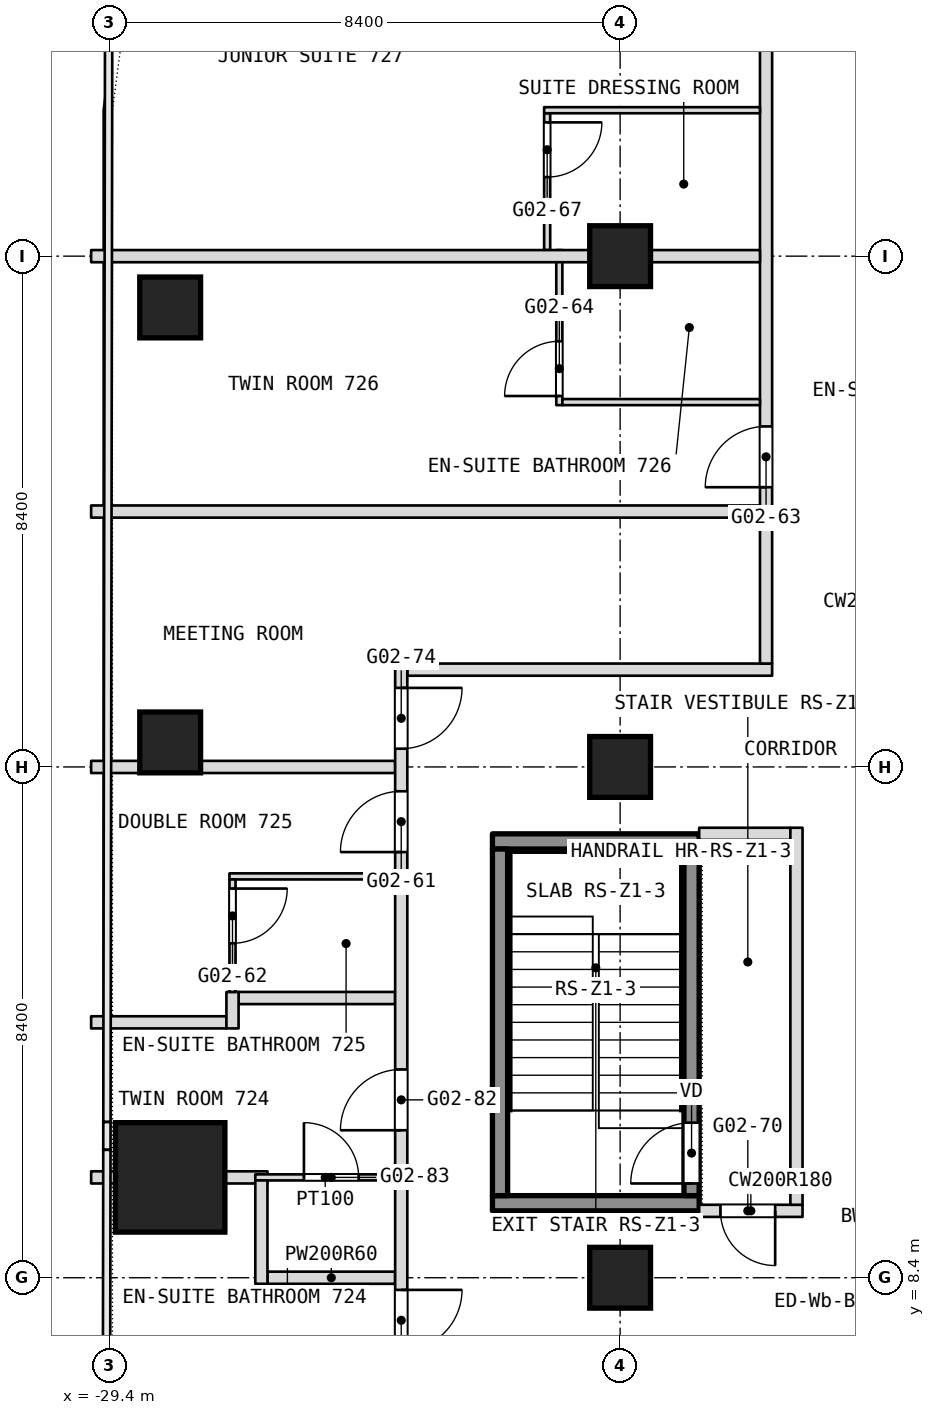
"""IFC4 building model, lengths in metres.
Left out: names, types, materials, properties, quantities, classifications, styles, units other than length and angle.
Written with IfcOpenShell. Run it as: python <this file> out.ifc"""

import sys

from ifc_helpers import new_model, si_unit, direction, frame, frame_2d, origin, origin_2d, place, context, subcontext, project, spatial, rectangle, extrude, element, fill, save


model = new_model("IFC4")
c1 = context("Model", 3, precision=1e-05, world=origin(), true_north=direction((0.0, 1.0)))
c2 = subcontext(c1, "Body", "Model", "MODEL_VIEW")
j1 = project(units=[si_unit("LENGTHUNIT", "METRE"), si_unit("PLANEANGLEUNIT", "RADIAN")], contexts=[c1])
p1 = place(None, origin())
s1 = spatial("IfcSite", under=j1, at=p1, CompositionType="ELEMENT")
p2 = place(p1, origin())
s2 = spatial("IfcBuilding", under=s1, at=p2, CompositionType="ELEMENT")
p3 = place(p2, frame((0.0, 0.0, 40.1)))
s3 = spatial("IfcBuildingStorey", under=s2, at=p3, CompositionType="ELEMENT", Elevation=40.1)
p4 = place(p3, frame((-28.4, 10.05, 0.0), z_axis=(0.0, 0.0, 1.0), x_axis=(1.0, 0.0, 0.0)))
e1 = element("IfcColumn", 1, at=p4, inside=s3, PredefinedType="COLUMN", context=c2, shape_type="SweptSolid", body=[
    extrude(rectangle(XDim=1.8, YDim=1.8, at=origin_2d()), origin(), (0.0, 0.0, 1.0), 3.6),
])
for number, where, z_axis, x_axis in (
    (2, (-21.0, 8.4, 0.0), (0.0, 0.0, 1.0), (1.0, 0.0, 0.0)),
    (3, (-21.0, 16.8, 0.0), (0.0, 0.0, 1.0), (1.0, 0.0, 0.0)),
    (4, (-21.0, 25.2, 0.0), (0.0, 0.0, 1.0), (1.0, 0.0, 0.0)),
    (5, (-28.4, 17.203, 0.0), (0.0, 0.0, 1.0), (1.0, 0.0, 0.0)),
    (6, (-28.4, 24.356, 0.0), (0.0, 0.0, 1.0), (1.0, 0.0, 0.0)),
):
    element("IfcColumn", number, at=place(p3, frame(where, z_axis=z_axis, x_axis=x_axis)), inside=s3, PredefinedType="COLUMN", context=c2, shape_type="SweptSolid", body=[
        extrude(rectangle(XDim=1.0, YDim=1.0, at=origin_2d()), origin(), (0.0, 0.0, 1.0), 3.6),
    ])
p5 = place(p3, frame((-26.8, 8.4, 0.0), z_axis=(0.0, 0.0, 1.0), x_axis=(1.0, 0.0, 0.0)))
e7 = element("IfcWall", 7, at=p5, inside=s3, PredefinedType="PARTITIONING", context=c2, shape_type="SweptSolid", body=[
    extrude(rectangle(XDim=2.1, YDim=0.2, at=frame_2d((1.05, 0.0))), origin(), (0.0, 0.0, 1.0), 2.84),
])
p6 = place(p3, frame((-19.7, 9.5, 0.0), z_axis=(0.0, 0.0, 1.0), x_axis=(1.0, 0.0, 0.0)))
e8 = element("IfcWall", 8, at=p6, inside=s3, PredefinedType="PARTITIONING", context=c2, shape_type="SweptSolid", body=[
    extrude(rectangle(XDim=1.7, YDim=0.2, at=frame_2d((0.85, 0.0))), origin(), (0.0, 0.0, 1.0), 3.34),
])
p7 = place(p6, frame((0.35, 0.0, 0.0)))
e9 = element("IfcOpeningElement", 9, at=p7, cuts=e8, PredefinedType="OPENING", context=c2, shape_type="SweptSolid", body=[
    extrude(rectangle(XDim=0.9, YDim=2.1, at=frame_2d((0.45, 1.05))), frame((0.0, 0.1, 0.0), z_axis=(0.0, -1.0, 0.0), x_axis=(1.0, 0.0, 0.0)), (0.0, 0.0, 1.0), 0.2),
])
p8 = place(p3, frame((-29.7, 10.05, 0.0), z_axis=(0.0, 0.0, 1.0), x_axis=(1.0, 0.0, 0.0)))
e10 = element("IfcWall", 10, at=p8, inside=s3, PredefinedType="PARTITIONING", context=c2, shape_type="SweptSolid", body=[
    extrude(rectangle(XDim=0.4, YDim=0.2, at=frame_2d((0.2, 0.0))), origin(), (0.0, 0.0, 1.0), 3.34),
])
p9 = place(p3, frame((-27.5, 10.05, 0.0), z_axis=(0.0, 0.0, 1.0), x_axis=(1.0, 0.0, 0.0)))
e11 = element("IfcWall", 11, at=p9, inside=s3, PredefinedType="PARTITIONING", context=c2, shape_type="SweptSolid", body=[
    extrude(rectangle(XDim=0.7, YDim=0.2, at=frame_2d((0.35, 0.0))), origin(), (0.0, 0.0, 1.0), 3.34),
])
p10 = place(p3, frame((-27.0, 10.05, 0.0), z_axis=(0.0, 0.0, 1.0), x_axis=(1.0, 0.0, 0.0)))
e12 = element("IfcWall", 12, at=p10, inside=s3, PredefinedType="PARTITIONING", context=c2, shape_type="SweptSolid", body=[
    extrude(rectangle(XDim=2.3, YDim=0.1, at=frame_2d((1.15, 0.0))), origin(), (0.0, 0.0, 1.0), 3.34),
])
p11 = place(p10, frame((0.8, 0.0, 0.0)))
e13 = element("IfcOpeningElement", 13, at=p11, cuts=e12, PredefinedType="OPENING", context=c2, shape_type="SweptSolid", body=[
    extrude(rectangle(XDim=0.9, YDim=2.1, at=frame_2d((0.45, 1.05))), frame((0.0, 0.05, 0.0), z_axis=(0.0, -1.0, 0.0), x_axis=(1.0, 0.0, 0.0)), (0.0, 0.0, 1.0), 0.1),
])
p12 = place(p3, frame((-29.7, 12.6, 0.0), z_axis=(0.0, 0.0, 1.0), x_axis=(1.0, 0.0, 0.0)))
e14 = element("IfcWall", 14, at=p12, inside=s3, PredefinedType="PARTITIONING", context=c2, shape_type="SweptSolid", body=[
    extrude(rectangle(XDim=2.225, YDim=0.2, at=frame_2d((1.112, 0.0))), origin(), (0.0, 0.0, 1.0), 3.34),
])
p13 = place(p3, frame((-27.275, 13.0, 0.0), z_axis=(0.0, 0.0, 1.0), x_axis=(1.0, 0.0, 0.0)))
e15 = element("IfcWall", 15, at=p13, inside=s3, PredefinedType="PARTITIONING", context=c2, shape_type="SweptSolid", body=[
    extrude(rectangle(XDim=2.575, YDim=0.2, at=frame_2d((1.288, 0.0))), origin(), (0.0, 0.0, 1.0), 3.34),
])
p14 = place(p3, frame((-27.425, 15.0, 0.0), z_axis=(0.0, 0.0, 1.0), x_axis=(1.0, 0.0, 0.0)))
e16 = element("IfcWall", 16, at=p14, inside=s3, PredefinedType="PARTITIONING", context=c2, shape_type="SweptSolid", body=[
    extrude(rectangle(XDim=2.725, YDim=0.1, at=frame_2d((1.363, 0.0))), origin(), (0.0, 0.0, 1.0), 3.34),
])
p15 = place(p3, frame((-19.7, 15.7, 0.0), z_axis=(0.0, 0.0, 1.0), x_axis=(1.0, 0.0, 0.0)))
e17 = element("IfcWall", 17, at=p15, inside=s3, PredefinedType="PARTITIONING", context=c2, shape_type="SweptSolid", body=[
    extrude(rectangle(XDim=1.5, YDim=0.2, at=frame_2d((0.75, 0.0))), origin(), (0.0, 0.0, 1.0), 3.34),
])
p16 = place(p3, frame((-29.7, 16.8, 0.0), z_axis=(0.0, 0.0, 1.0), x_axis=(1.0, 0.0, 0.0)))
e18 = element("IfcWall", 18, at=p16, inside=s3, PredefinedType="PARTITIONING", context=c2, shape_type="SweptSolid", body=[
    extrude(rectangle(XDim=5.0, YDim=0.2, at=frame_2d((2.5, 0.0))), origin(), (0.0, 0.0, 1.0), 2.84),
])
p17 = place(p3, frame((-18.1, 9.6, 0.0), z_axis=(0.0, 0.0, 1.0), x_axis=(0.0, 1.0, 0.0)))
e19 = element("IfcWall", 19, at=p17, inside=s3, PredefinedType="PARTITIONING", context=c2, shape_type="SweptSolid", body=[
    extrude(rectangle(XDim=6.2, YDim=0.2, at=frame_2d((3.1, 0.0))), origin(), (0.0, 0.0, 1.0), 3.34),
])
p18 = place(p3, frame((-24.5, 18.4, 0.0), z_axis=(0.0, 0.0, 1.0), x_axis=(1.0, 0.0, 0.0)))
e20 = element("IfcWall", 20, at=p18, inside=s3, PredefinedType="PARTITIONING", context=c2, shape_type="SweptSolid", body=[
    extrude(rectangle(XDim=6.0, YDim=0.2, at=frame_2d((3.0, 0.0))), origin(), (0.0, 0.0, 1.0), 3.34),
])
p19 = place(p3, frame((-18.6, 18.5, 0.0), z_axis=(0.0, 0.0, 1.0), x_axis=(0.0, 1.0, 0.0)))
e21 = element("IfcWall", 21, at=p19, inside=s3, PredefinedType="PARTITIONING", context=c2, shape_type="SweptSolid", body=[
    extrude(rectangle(XDim=15.04, YDim=0.2, at=frame_2d((7.52, 0.0))), origin(), (0.0, 0.0, 1.0), 3.34),
])
p20 = place(p19, frame((2.9, 0.0, 0.0)))
e22 = element("IfcOpeningElement", 22, at=p20, cuts=e21, PredefinedType="OPENING", context=c2, shape_type="SweptSolid", body=[
    extrude(rectangle(XDim=1.0, YDim=2.1, at=frame_2d((0.5, 1.05))), frame((0.0, 0.1, 0.0), z_axis=(0.0, -1.0, 0.0), x_axis=(1.0, 0.0, 0.0)), (0.0, 0.0, 1.0), 0.2),
])
p21 = place(p19, frame((10.3, 0.0, 0.0)))
e23 = element("IfcOpeningElement", 23, at=p21, cuts=e21, PredefinedType="OPENING", context=c2, shape_type="SweptSolid", body=[
    extrude(rectangle(XDim=1.1, YDim=2.1, at=frame_2d((0.55, 1.05))), frame((0.0, 0.1, 0.0), z_axis=(0.0, -1.0, 0.0), x_axis=(1.0, 0.0, 0.0)), (0.0, 0.0, 1.0), 0.2),
])
p22 = place(p3, frame((-29.7, 21.0, 0.0), z_axis=(0.0, 0.0, 1.0), x_axis=(1.0, 0.0, 0.0)))
e24 = element("IfcWall", 24, at=p22, inside=s3, PredefinedType="PARTITIONING", context=c2, shape_type="SweptSolid", body=[
    extrude(rectangle(XDim=11.0, YDim=0.2, at=frame_2d((5.5, 0.0))), origin(), (0.0, 0.0, 1.0), 3.34),
])
p23 = place(p3, frame((-22.0, 22.75, 0.0), z_axis=(0.0, 0.0, 1.0), x_axis=(0.0, 1.0, 0.0)))
e25 = element("IfcWall", 25, at=p23, inside=s3, PredefinedType="PARTITIONING", context=c2, shape_type="SweptSolid", body=[
    extrude(rectangle(XDim=2.55, YDim=0.1, at=frame_2d((1.275, 0.0))), origin(), (0.0, 0.0, 1.0), 3.34),
])
p24 = place(p23, frame((0.15, 0.0, 0.0)))
e26 = element("IfcOpeningElement", 26, at=p24, cuts=e25, PredefinedType="OPENING", context=c2, shape_type="SweptSolid", body=[
    extrude(rectangle(XDim=0.9, YDim=2.1, at=frame_2d((0.45, 1.05))), frame((0.0, 0.05, 0.0), z_axis=(0.0, -1.0, 0.0), x_axis=(1.0, 0.0, 0.0)), (0.0, 0.0, 1.0), 0.1),
])
p25 = place(p3, frame((-22.2, 25.3, 0.0), z_axis=(0.0, 0.0, 1.0), x_axis=(0.0, 1.0, 0.0)))
e27 = element("IfcWall", 27, at=p25, inside=s3, PredefinedType="PARTITIONING", context=c2, shape_type="SweptSolid", body=[
    extrude(rectangle(XDim=2.25, YDim=0.1, at=frame_2d((1.125, 0.0))), origin(), (0.0, 0.0, 1.0), 3.34),
])
p26 = place(p25, frame((1.2, 0.0, 0.0)))
e28 = element("IfcOpeningElement", 28, at=p26, cuts=e27, PredefinedType="OPENING", context=c2, shape_type="SweptSolid", body=[
    extrude(rectangle(XDim=0.9, YDim=2.1, at=frame_2d((0.45, 1.05))), frame((0.0, 0.05, 0.0), z_axis=(0.0, -1.0, 0.0), x_axis=(1.0, 0.0, 0.0)), (0.0, 0.0, 1.0), 0.1),
])
p27 = place(p3, frame((-21.95, 22.8, 0.0), z_axis=(0.0, 0.0, 1.0), x_axis=(1.0, 0.0, 0.0)))
e29 = element("IfcWall", 29, at=p27, inside=s3, PredefinedType="PARTITIONING", context=c2, shape_type="SweptSolid", body=[
    extrude(rectangle(XDim=3.25, YDim=0.1, at=frame_2d((1.625, 0.0))), origin(), (0.0, 0.0, 1.0), 3.34),
])
p28 = place(p3, frame((-24.6, 6.9, 0.0), z_axis=(0.0, 0.0, 1.0), x_axis=(0.0, 1.0, 0.0)))
e30 = element("IfcWall", 30, at=p28, inside=s3, PredefinedType="PARTITIONING", context=c2, shape_type="SweptSolid", body=[
    extrude(rectangle(XDim=11.6, YDim=0.2, at=frame_2d((5.8, 0.0))), origin(), (0.0, 0.0, 1.0), 3.34),
])
p29 = place(p28, frame((8.5, 0.0, 0.0)))
e31 = element("IfcOpeningElement", 31, at=p29, cuts=e30, PredefinedType="OPENING", context=c2, shape_type="SweptSolid", body=[
    extrude(rectangle(XDim=1.0, YDim=2.1, at=frame_2d((0.5, 1.05))), frame((0.0, 0.1, 0.0), z_axis=(0.0, -1.0, 0.0), x_axis=(1.0, 0.0, 0.0)), (0.0, 0.0, 1.0), 0.2),
])
p30 = place(p28, frame((10.2, 0.0, 0.0)))
e32 = element("IfcOpeningElement", 32, at=p30, cuts=e30, PredefinedType="OPENING", context=c2, shape_type="SweptSolid", body=[
    extrude(rectangle(XDim=1.0, YDim=2.1, at=frame_2d((0.5, 1.05))), frame((0.0, 0.1, 0.0), z_axis=(0.0, -1.0, 0.0), x_axis=(1.0, 0.0, 0.0)), (0.0, 0.0, 1.0), 0.2),
])
p31 = place(p28, frame((0.3, 0.0, 0.0)))
e33 = element("IfcOpeningElement", 33, at=p31, cuts=e30, PredefinedType="OPENING", context=c2, shape_type="SweptSolid", body=[
    extrude(rectangle(XDim=1.0, YDim=2.1, at=frame_2d((0.5, 1.05))), frame((0.0, 0.1, 0.0), z_axis=(0.0, -1.0, 0.0), x_axis=(1.0, 0.0, 0.0)), (0.0, 0.0, 1.0), 0.2),
])
p32 = place(p28, frame((3.925, 0.0, 0.0)))
e34 = element("IfcOpeningElement", 34, at=p32, cuts=e30, PredefinedType="OPENING", context=c2, shape_type="SweptSolid", body=[
    extrude(rectangle(XDim=1.0, YDim=2.1, at=frame_2d((0.5, 1.05))), frame((0.0, 0.1, 0.0), z_axis=(0.0, -1.0, 0.0), x_axis=(1.0, 0.0, 0.0)), (0.0, 0.0, 1.0), 0.2),
])
p33 = place(p3, frame((-29.7, 25.2, 0.0), z_axis=(0.0, 0.0, 1.0), x_axis=(1.0, 0.0, 0.0)))
e35 = element("IfcWall", 35, at=p33, inside=s3, PredefinedType="PARTITIONING", context=c2, shape_type="SweptSolid", body=[
    extrude(rectangle(XDim=11.0, YDim=0.2, at=frame_2d((5.5, 0.0))), origin(), (0.0, 0.0, 1.0), 2.84),
])
p34 = place(p3, frame((-26.9, 8.3, 0.0), z_axis=(0.0, 0.0, 1.0), x_axis=(0.0, 1.0, 0.0)))
e36 = element("IfcWall", 36, at=p34, inside=s3, PredefinedType="PARTITIONING", context=c2, shape_type="SweptSolid", body=[
    extrude(rectangle(XDim=1.7, YDim=0.2, at=frame_2d((0.85, 0.0))), origin(), (0.0, 0.0, 1.0), 3.34),
])
p35 = place(p3, frame((-27.375, 12.5, 0.0), z_axis=(0.0, 0.0, 1.0), x_axis=(0.0, 1.0, 0.0)))
e37 = element("IfcWall", 37, at=p35, inside=s3, PredefinedType="PARTITIONING", context=c2, shape_type="SweptSolid", body=[
    extrude(rectangle(XDim=0.6, YDim=0.2, at=frame_2d((0.3, 0.0))), origin(), (0.0, 0.0, 1.0), 3.34),
])
p36 = place(p3, frame((-27.375, 13.1, 0.0), z_axis=(0.0, 0.0, 1.0), x_axis=(0.0, 1.0, 0.0)))
e38 = element("IfcWall", 38, at=p36, inside=s3, PredefinedType="PARTITIONING", context=c2, shape_type="SweptSolid", body=[
    extrude(rectangle(XDim=1.85, YDim=0.1, at=frame_2d((0.925, 0.0))), origin(), (0.0, 0.0, 1.0), 3.34),
])
p37 = place(p36, frame((0.8, 0.0, 0.0)))
e39 = element("IfcOpeningElement", 39, at=p37, cuts=e38, PredefinedType="OPENING", context=c2, shape_type="SweptSolid", body=[
    extrude(rectangle(XDim=0.9, YDim=2.1, at=frame_2d((0.45, 1.05))), frame((0.0, 0.05, 0.0), z_axis=(0.0, -1.0, 0.0), x_axis=(1.0, 0.0, 0.0)), (0.0, 0.0, 1.0), 0.1),
])
p38 = place(p3, frame((-22.25, 27.6, 0.0), z_axis=(0.0, 0.0, 1.0), x_axis=(1.0, 0.0, 0.0)))
e40 = element("IfcWall", 40, at=p38, inside=s3, PredefinedType="PARTITIONING", context=c2, shape_type="SweptSolid", body=[
    extrude(rectangle(XDim=3.55, YDim=0.1, at=frame_2d((1.775, 0.0))), origin(), (0.0, 0.0, 1.0), 3.34),
])
for number, where, z_axis, x_axis in (
    (41, (-23.1, 9.625, 0.1), (0.0, 0.0, 1.0), (1.0, 0.0, 0.0)),
    (42, (-23.1, 15.575, 0.1), (0.0, 0.0, 1.0), (1.0, 0.0, 0.0)),
):
    element("IfcWall", number, at=place(p3, frame(where, z_axis=z_axis, x_axis=x_axis)), inside=s3, PredefinedType="SHEAR", context=c2, shape_type="SweptSolid", body=[
        extrude(rectangle(XDim=3.4, YDim=0.25, at=frame_2d((1.7, 0.0))), origin(), (0.0, 0.0, 1.0), 3.6),
    ])
p39 = place(p3, frame((-22.975, 9.75, 0.1), z_axis=(0.0, 0.0, 1.0), x_axis=(0.0, 1.0, 0.0)))
e43 = element("IfcWall", 43, at=p39, inside=s3, PredefinedType="SHEAR", context=c2, shape_type="SweptSolid", body=[
    extrude(rectangle(XDim=5.7, YDim=0.25, at=frame_2d((2.85, 0.0))), origin(), (0.0, 0.0, 1.0), 3.6),
])
p40 = place(p3, frame((-19.825, 9.75, 0.1), z_axis=(0.0, 0.0, 1.0), x_axis=(0.0, 1.0, 0.0)))
e44 = element("IfcWall", 44, at=p40, inside=s3, PredefinedType="SHEAR", context=c2, shape_type="SweptSolid", body=[
    extrude(rectangle(XDim=5.7, YDim=0.25, at=frame_2d((2.85, 0.0))), origin(), (0.0, 0.0, 1.0), 3.6),
])
p41 = place(p40, frame((0.2, 0.0, 0.0)))
e45 = element("IfcOpeningElement", 45, at=p41, cuts=e44, PredefinedType="OPENING", context=c2, shape_type="SweptSolid", body=[
    extrude(rectangle(XDim=1.0, YDim=2.1, at=frame_2d((0.5, 1.05))), frame((0.0, 0.125, 0.0), z_axis=(0.0, -1.0, 0.0), x_axis=(1.0, 0.0, 0.0)), (0.0, 0.0, 1.0), 0.25),
])
p42 = place(p7, origin())
e46 = element("IfcDoor", 46, at=p42, inside=s3, OperationType="SINGLE_SWING_RIGHT", PredefinedType="DOOR", context=c2, shape_type="SweptSolid", body=[
    extrude(rectangle(XDim=0.9, YDim=2.1, at=frame_2d((0.45, 1.05))), frame((0.0, 0.025, 0.0), z_axis=(0.0, -1.0, 0.0), x_axis=(1.0, 0.0, 0.0)), (0.0, 0.0, 1.0), 0.05),
])
fill(e9, e46)
p43 = place(p11, origin())
e47 = element("IfcDoor", 47, at=p43, inside=s3, OperationType="SINGLE_SWING_LEFT", PredefinedType="DOOR", context=c2, shape_type="SweptSolid", body=[
    extrude(rectangle(XDim=0.9, YDim=2.1, at=frame_2d((0.45, 1.05))), frame((0.0, 0.025, 0.0), z_axis=(0.0, -1.0, 0.0), x_axis=(1.0, 0.0, 0.0)), (0.0, 0.0, 1.0), 0.05),
])
fill(e13, e47)
p44 = place(p20, origin())
e48 = element("IfcDoor", 48, at=p44, inside=s3, OperationType="SINGLE_SWING_RIGHT", PredefinedType="DOOR", context=c2, shape_type="SweptSolid", body=[
    extrude(rectangle(XDim=1.0, YDim=2.1, at=frame_2d((0.5, 1.05))), frame((0.0, 0.025, 0.0), z_axis=(0.0, -1.0, 0.0), x_axis=(1.0, 0.0, 0.0)), (0.0, 0.0, 1.0), 0.05),
])
fill(e22, e48)
p45 = place(p24, origin())
e49 = element("IfcDoor", 49, at=p45, inside=s3, OperationType="SINGLE_SWING_RIGHT", PredefinedType="DOOR", context=c2, shape_type="SweptSolid", body=[
    extrude(rectangle(XDim=0.9, YDim=2.1, at=frame_2d((0.45, 1.05))), frame((0.0, 0.025, 0.0), z_axis=(0.0, -1.0, 0.0), x_axis=(1.0, 0.0, 0.0)), (0.0, 0.0, 1.0), 0.05),
])
fill(e26, e49)
p46 = place(p26, origin())
e50 = element("IfcDoor", 50, at=p46, inside=s3, OperationType="SINGLE_SWING_LEFT", PredefinedType="DOOR", context=c2, shape_type="SweptSolid", body=[
    extrude(rectangle(XDim=0.9, YDim=2.1, at=frame_2d((0.45, 1.05))), frame((0.0, 0.025, 0.0), z_axis=(0.0, -1.0, 0.0), x_axis=(1.0, 0.0, 0.0)), (0.0, 0.0, 1.0), 0.05),
])
fill(e28, e50)
p47 = place(p29, origin())
e51 = element("IfcDoor", 51, at=p47, inside=s3, OperationType="SINGLE_SWING_RIGHT", PredefinedType="DOOR", context=c2, shape_type="SweptSolid", body=[
    extrude(rectangle(XDim=1.0, YDim=2.1, at=frame_2d((0.5, 1.05))), frame((0.0, 0.025, 0.0), z_axis=(0.0, -1.0, 0.0), x_axis=(1.0, 0.0, 0.0)), (0.0, 0.0, 1.0), 0.05),
])
fill(e31, e51)
p48 = place(p30, origin())
e52 = element("IfcDoor", 52, at=p48, inside=s3, OperationType="SINGLE_SWING_RIGHT", PredefinedType="DOOR", context=c2, shape_type="SweptSolid", body=[
    extrude(rectangle(XDim=1.0, YDim=2.1, at=frame_2d((0.5, 1.05))), frame((0.0, 0.025, 0.0), z_axis=(0.0, -1.0, 0.0), x_axis=(1.0, 0.0, 0.0)), (0.0, 0.0, 1.0), 0.05),
])
fill(e32, e52)
p49 = place(p31, origin())
e53 = element("IfcDoor", 53, at=p49, inside=s3, OperationType="SINGLE_SWING_LEFT", PredefinedType="DOOR", context=c2, shape_type="SweptSolid", body=[
    extrude(rectangle(XDim=1.0, YDim=2.1, at=frame_2d((0.5, 1.05))), frame((0.0, 0.025, 0.0), z_axis=(0.0, -1.0, 0.0), x_axis=(1.0, 0.0, 0.0)), (0.0, 0.0, 1.0), 0.05),
])
fill(e33, e53)
p50 = place(p32, origin())
e54 = element("IfcDoor", 54, at=p50, inside=s3, OperationType="SINGLE_SWING_LEFT", PredefinedType="DOOR", context=c2, shape_type="SweptSolid", body=[
    extrude(rectangle(XDim=1.0, YDim=2.1, at=frame_2d((0.5, 1.05))), frame((0.0, 0.025, 0.0), z_axis=(0.0, -1.0, 0.0), x_axis=(1.0, 0.0, 0.0)), (0.0, 0.0, 1.0), 0.05),
])
fill(e34, e54)
p51 = place(p37, origin())
e55 = element("IfcDoor", 55, at=p51, inside=s3, OperationType="SINGLE_SWING_LEFT", PredefinedType="DOOR", context=c2, shape_type="SweptSolid", body=[
    extrude(rectangle(XDim=0.9, YDim=2.1, at=frame_2d((0.45, 1.05))), frame((0.0, 0.025, 0.0), z_axis=(0.0, -1.0, 0.0), x_axis=(1.0, 0.0, 0.0)), (0.0, 0.0, 1.0), 0.05),
])
fill(e39, e55)
p52 = place(p41, origin())
e56 = element("IfcDoor", 56, at=p52, inside=s3, OperationType="SINGLE_SWING_LEFT", PredefinedType="DOOR", context=c2, shape_type="SweptSolid", body=[
    extrude(rectangle(XDim=1.0, YDim=2.1, at=frame_2d((0.5, 1.05))), frame((0.0, 0.025, 0.0), z_axis=(0.0, -1.0, 0.0), x_axis=(1.0, 0.0, 0.0)), (0.0, 0.0, 1.0), 0.05),
])
fill(e45, e56)
save(model, sys.argv[1])
